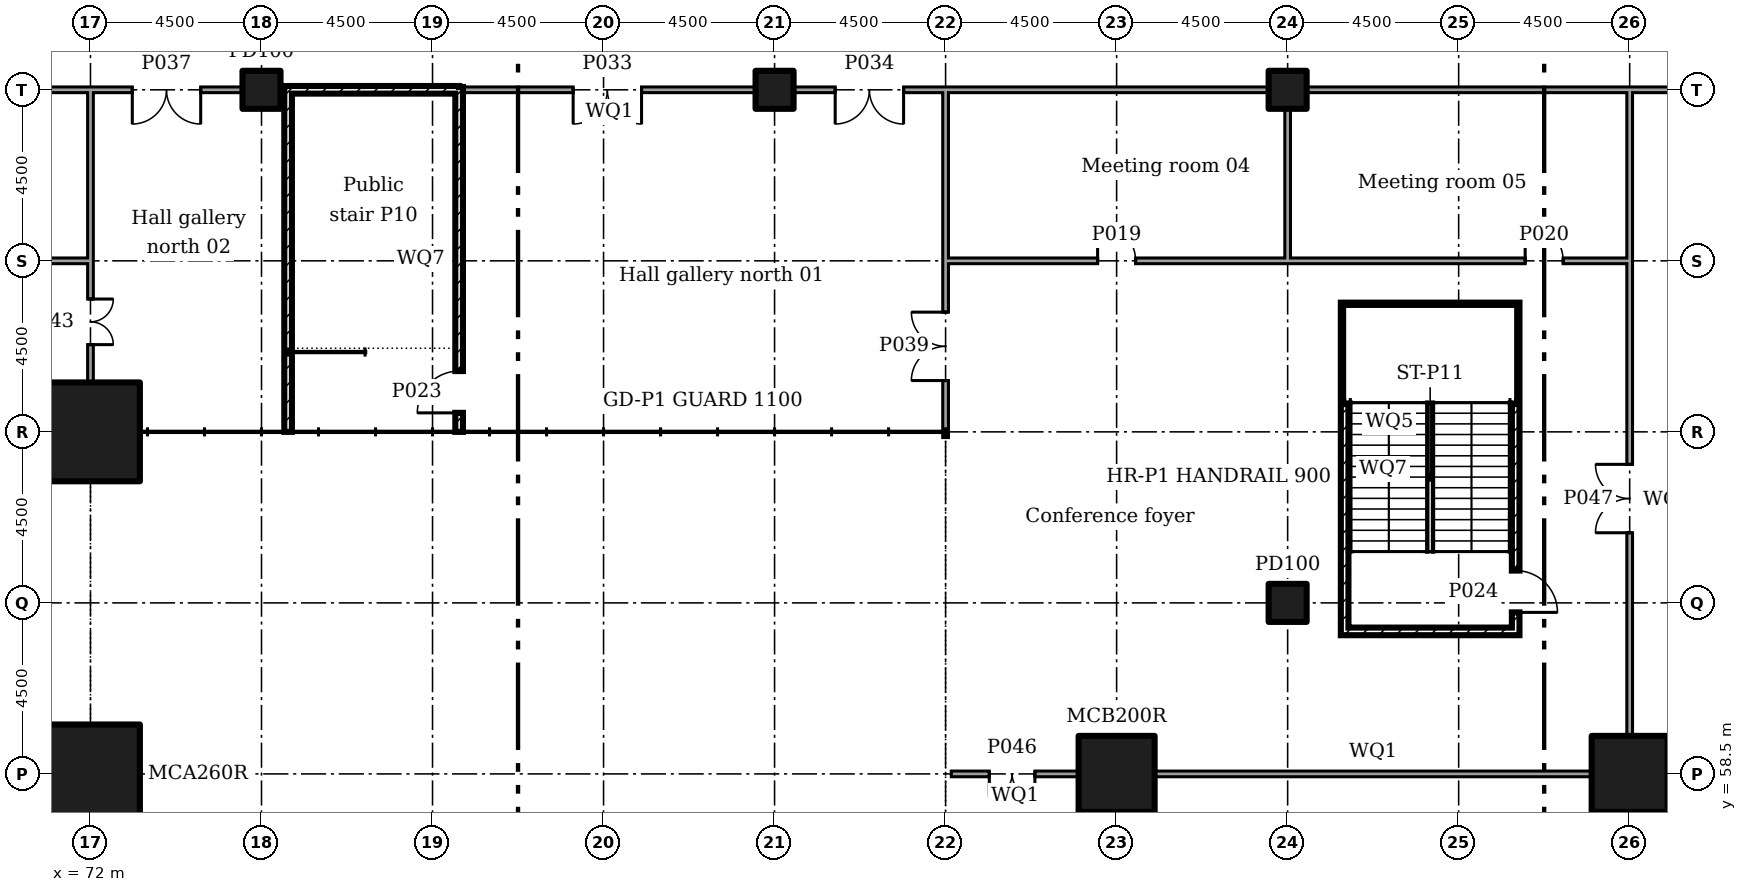
"""IFC4 building model, lengths in metres.
Left out: names, types, materials, properties, quantities, classifications, styles, units other than length and angle.
Written with IfcOpenShell. Run it as: python <this file> out.ifc"""

import sys

from ifc_helpers import new_model, si_unit, direction, frame, frame_2d, origin, origin_2d, place, context, subcontext, project, spatial, rectangle, extrude, element, fill, save


model = new_model("IFC4")
c1 = context("Model", 3, precision=1e-05, world=origin(), true_north=direction((0.0, 1.0)))
c2 = subcontext(c1, "Body", "Model", "MODEL_VIEW")
j1 = project(units=[si_unit("LENGTHUNIT", "METRE"), si_unit("PLANEANGLEUNIT", "RADIAN")], contexts=[c1])
p1 = place(None, origin())
s1 = spatial("IfcSite", under=j1, at=p1, CompositionType="ELEMENT")
p2 = place(p1, origin())
s2 = spatial("IfcBuilding", under=s1, at=p2, CompositionType="ELEMENT")
p3 = place(p2, frame((0.0, 0.0, 11.5)))
s3 = spatial("IfcBuildingStorey", under=s2, at=p3, CompositionType="ELEMENT", Elevation=11.5)
for number, where in (
    (1, (72.0, 58.5, 0.0)),
    (2, (72.0, 67.5, 0.0)),
):
    element("IfcColumn", number, at=place(p3, frame(where)), inside=s3, PredefinedType="COLUMN", context=c2, shape_type="SweptSolid", body=[
        extrude(rectangle(XDim=2.6, YDim=2.6, at=origin_2d()), origin(), (0.0, 0.0, 1.0), 5.0),
    ])
for number, where in (
    (3, (99.0, 58.5, 0.0)),
    (4, (112.5, 58.5, 0.0)),
):
    element("IfcColumn", number, at=place(p3, frame(where)), inside=s3, PredefinedType="COLUMN", context=c2, shape_type="SweptSolid", body=[
        extrude(rectangle(XDim=2.0, YDim=2.0, at=origin_2d()), origin(), (0.0, 0.0, 1.0), 5.0),
    ])
for number, where in (
    (5, (76.5, 76.5, 0.0)),
    (6, (90.0, 76.5, 0.0)),
    (7, (103.5, 63.0, 0.0)),
    (8, (103.5, 76.5, 0.0)),
):
    element("IfcColumn", number, at=place(p3, frame(where)), inside=s3, PredefinedType="COLUMN", context=c2, shape_type="SweptSolid", body=[
        extrude(rectangle(XDim=1.0, YDim=1.0, at=origin_2d()), origin(), (0.0, 0.0, 1.0), 5.0),
    ])
p4 = place(p2, frame((0.0, 0.0, 6.0)))
s4 = spatial("IfcBuildingStorey", under=s2, at=p4, CompositionType="ELEMENT", Elevation=6.0)
p5 = place(p4, frame((72.0, 59.795, 0.0), z_axis=(0.0, 0.0, 1.0), x_axis=(0.0, 1.0, 0.0)))
e9 = element("IfcWall", 9, at=p5, inside=s4, PredefinedType="SOLIDWALL", context=c2, shape_type="SweptSolid", body=[
    extrude(rectangle(XDim=6.41, YDim=0.3, at=frame_2d((3.205, 0.0))), origin(), (0.0, 0.0, 1.0), 10.05),
])
p6 = place(p4, frame((94.5, 54.995, 0.0), z_axis=(0.0, 0.0, 1.0), x_axis=(0.0, 1.0, 0.0)))
e10 = element("IfcWall", 10, at=p6, inside=s4, PredefinedType="SOLIDWALL", context=c2, shape_type="SweptSolid", body=[
    extrude(rectangle(XDim=3.58, YDim=0.3, at=frame_2d((1.79, 0.0))), origin(), (0.0, 0.0, 1.0), 10.05),
])
p7 = place(p4, frame((94.5, 58.425, 0.0), z_axis=(0.0, 0.0, 1.0), x_axis=(0.0, 1.0, 0.0)))
e11 = element("IfcWall", 11, at=p7, inside=s4, PredefinedType="SOLIDWALL", context=c2, shape_type="SweptSolid", body=[
    extrude(rectangle(XDim=8.925, YDim=0.3, at=frame_2d((4.462, 0.0))), origin(), (0.0, 0.0, 1.0), 10.05),
])
p8 = place(p3, frame((81.8, 76.5, 0.0)))
e12 = element("IfcWall", 12, at=p8, inside=s3, PredefinedType="PARTITIONING", context=c2, shape_type="SweptSolid", body=[
    extrude(rectangle(XDim=7.705, YDim=0.15, at=frame_2d((3.853, 0.0))), origin(), (0.0, 0.0, 1.0), 4.55),
])
p9 = place(p8, frame((2.9, 0.0, 0.0)))
e13 = element("IfcOpeningElement", 13, at=p9, cuts=e12, PredefinedType="OPENING", context=c2, shape_type="SweptSolid", body=[
    extrude(rectangle(XDim=1.8, YDim=2.1, at=frame_2d((0.9, 1.05))), frame((0.0, 0.085, 0.0), z_axis=(0.0, -1.0, 0.0), x_axis=(1.0, 0.0, 0.0)), (0.0, 0.0, 1.0), 0.17),
])
p10 = place(p3, frame((90.495, 76.5, 0.0)))
e14 = element("IfcWall", 14, at=p10, inside=s3, PredefinedType="PARTITIONING", context=c2, shape_type="SweptSolid", body=[
    extrude(rectangle(XDim=4.08, YDim=0.15, at=frame_2d((2.04, 0.0))), origin(), (0.0, 0.0, 1.0), 4.55),
])
p11 = place(p10, frame((1.1, 0.0, 0.0)))
e15 = element("IfcOpeningElement", 15, at=p11, cuts=e14, PredefinedType="OPENING", context=c2, shape_type="SweptSolid", body=[
    extrude(rectangle(XDim=1.8, YDim=2.1, at=frame_2d((0.9, 1.05))), frame((0.0, 0.085, 0.0), z_axis=(0.0, -1.0, 0.0), x_axis=(1.0, 0.0, 0.0)), (0.0, 0.0, 1.0), 0.17),
])
p12 = place(p3, frame((63.495, 76.5, 0.0)))
e16 = element("IfcWall", 16, at=p12, inside=s3, PredefinedType="PARTITIONING", context=c2, shape_type="SweptSolid", body=[
    extrude(rectangle(XDim=8.58, YDim=0.15, at=frame_2d((4.29, 0.0))), origin(), (0.0, 0.0, 1.0), 4.55),
])
p13 = place(p3, frame((94.5, 76.5, 0.0)))
e17 = element("IfcWall", 17, at=p13, inside=s3, PredefinedType="PARTITIONING", context=c2, shape_type="SweptSolid", body=[
    extrude(rectangle(XDim=8.505, YDim=0.15, at=frame_2d((4.252, 0.0))), origin(), (0.0, 0.0, 1.0), 4.55),
])
p14 = place(p3, frame((103.995, 76.5, 0.0)))
e18 = element("IfcWall", 18, at=p14, inside=s3, PredefinedType="PARTITIONING", context=c2, shape_type="SweptSolid", body=[
    extrude(rectangle(XDim=8.58, YDim=0.15, at=frame_2d((4.29, 0.0))), origin(), (0.0, 0.0, 1.0), 4.55),
])
p15 = place(p3, frame((112.5, 76.5, 0.0)))
e19 = element("IfcWall", 19, at=p15, inside=s3, PredefinedType="PARTITIONING", context=c2, shape_type="SweptSolid", body=[
    extrude(rectangle(XDim=4.005, YDim=0.15, at=frame_2d((2.002, 0.0))), origin(), (0.0, 0.0, 1.0), 4.55),
])
p16 = place(p15, frame((1.1, 0.0, 0.0)))
e20 = element("IfcOpeningElement", 20, at=p16, cuts=e19, PredefinedType="OPENING", context=c2, shape_type="SweptSolid", body=[
    extrude(rectangle(XDim=1.8, YDim=2.1, at=frame_2d((0.9, 1.05))), frame((0.0, 0.085, 0.0), z_axis=(0.0, -1.0, 0.0), x_axis=(1.0, 0.0, 0.0)), (0.0, 0.0, 1.0), 0.17),
])
p17 = place(p3, frame((72.0, 76.5, 0.0)))
e21 = element("IfcWall", 21, at=p17, inside=s3, PredefinedType="PARTITIONING", context=c2, shape_type="SweptSolid", body=[
    extrude(rectangle(XDim=4.005, YDim=0.15, at=frame_2d((2.002, 0.0))), origin(), (0.0, 0.0, 1.0), 4.55),
])
p18 = place(p17, frame((1.1, 0.0, 0.0)))
e22 = element("IfcOpeningElement", 22, at=p18, cuts=e21, PredefinedType="OPENING", context=c2, shape_type="SweptSolid", body=[
    extrude(rectangle(XDim=1.8, YDim=2.1, at=frame_2d((0.9, 1.05))), frame((0.0, 0.085, 0.0), z_axis=(0.0, -1.0, 0.0), x_axis=(1.0, 0.0, 0.0)), (0.0, 0.0, 1.0), 0.17),
])
p19 = place(p3, frame((77.1, 76.5, 0.0)))
e23 = element("IfcWall", 23, at=p19, inside=s3, PredefinedType="SOLIDWALL", context=c2, shape_type="SweptSolid", body=[
    extrude(rectangle(XDim=4.6, YDim=0.2, at=frame_2d((2.3, 0.0))), origin(), (0.0, 0.0, 1.0), 4.55),
])
p20 = place(p3, frame((94.5, 67.35, 0.0), z_axis=(0.0, 0.0, 1.0), x_axis=(0.0, 1.0, 0.0)))
e24 = element("IfcWall", 24, at=p20, inside=s3, PredefinedType="PARTITIONING", context=c2, shape_type="SweptSolid", body=[
    extrude(rectangle(XDim=4.725, YDim=0.15, at=frame_2d((2.362, 0.0))), origin(), (0.0, 0.0, 1.0), 4.55),
])
p21 = place(p20, frame((1.5, 0.0, 0.0)))
e25 = element("IfcOpeningElement", 25, at=p21, cuts=e24, PredefinedType="OPENING", context=c2, shape_type="SweptSolid", body=[
    extrude(rectangle(XDim=1.8, YDim=2.1, at=frame_2d((0.9, 1.05))), frame((0.0, 0.085, 0.0), z_axis=(0.0, -1.0, 0.0), x_axis=(1.0, 0.0, 0.0)), (0.0, 0.0, 1.0), 0.17),
])
p22 = place(p3, frame((94.5, 72.0, 0.0), z_axis=(0.0, 0.0, 1.0), x_axis=(0.0, 1.0, 0.0)))
e26 = element("IfcWall", 26, at=p22, inside=s3, PredefinedType="PARTITIONING", context=c2, shape_type="SweptSolid", body=[
    extrude(rectangle(XDim=4.425, YDim=0.15, at=frame_2d((2.212, 0.0))), origin(), (0.0, 0.0, 1.0), 4.55),
])
p23 = place(p3, frame((81.7, 67.5, 0.0), z_axis=(0.0, 0.0, 1.0), x_axis=(0.0, 1.0, 0.0)))
e27 = element("IfcWall", 27, at=p23, inside=s3, PredefinedType="SOLIDWALL", context=c2, shape_type="SweptSolid", body=[
    extrude(rectangle(XDim=9.075, YDim=0.2, at=frame_2d((4.538, 0.0))), origin(), (0.0, 0.0, 1.0), 4.55),
])
p24 = place(p23, frame((0.5, 0.0, 0.0)))
e28 = element("IfcOpeningElement", 28, at=p24, cuts=e27, PredefinedType="OPENING", context=c2, shape_type="SweptSolid", body=[
    extrude(rectangle(XDim=1.1, YDim=2.1, at=frame_2d((0.55, 1.05))), frame((0.0, 0.11, 0.0), z_axis=(0.0, -1.0, 0.0), x_axis=(1.0, 0.0, 0.0)), (0.0, 0.0, 1.0), 0.22),
])
p25 = place(p3, frame((68.795, 72.0, 0.0)))
e29 = element("IfcWall", 29, at=p25, inside=s3, PredefinedType="PARTITIONING", context=c2, shape_type="SweptSolid", body=[
    extrude(rectangle(XDim=3.28, YDim=0.15, at=frame_2d((1.64, 0.0))), origin(), (0.0, 0.0, 1.0), 4.55),
])
p26 = place(p3, frame((72.0, 72.0, 0.0), z_axis=(0.0, 0.0, 1.0), x_axis=(0.0, 1.0, 0.0)))
e30 = element("IfcWall", 30, at=p26, inside=s3, PredefinedType="PARTITIONING", context=c2, shape_type="SweptSolid", body=[
    extrude(rectangle(XDim=4.425, YDim=0.15, at=frame_2d((2.212, 0.0))), origin(), (0.0, 0.0, 1.0), 4.55),
])
p27 = place(p3, frame((72.0, 68.795, 0.0), z_axis=(0.0, 0.0, 1.0), x_axis=(0.0, 1.0, 0.0)))
e31 = element("IfcWall", 31, at=p27, inside=s3, PredefinedType="PARTITIONING", context=c2, shape_type="SweptSolid", body=[
    extrude(rectangle(XDim=3.13, YDim=0.15, at=frame_2d((1.565, 0.0))), origin(), (0.0, 0.0, 1.0), 4.55),
])
p28 = place(p27, frame((1.0, 0.0, 0.0)))
e32 = element("IfcOpeningElement", 32, at=p28, cuts=e31, PredefinedType="OPENING", context=c2, shape_type="SweptSolid", body=[
    extrude(rectangle(XDim=1.2, YDim=2.1, at=frame_2d((0.6, 1.05))), frame((0.0, 0.085, 0.0), z_axis=(0.0, -1.0, 0.0), x_axis=(1.0, 0.0, 0.0)), (0.0, 0.0, 1.0), 0.17),
])
p29 = place(p3, frame((99.0, 54.0, 0.0), z_axis=(0.0, 0.0, 1.0), x_axis=(0.0, 1.0, 0.0)))
e33 = element("IfcWall", 33, at=p29, inside=s3, PredefinedType="PARTITIONING", context=c2, shape_type="SweptSolid", body=[
    extrude(rectangle(XDim=3.505, YDim=0.15, at=frame_2d((1.752, 0.0))), origin(), (0.0, 0.0, 1.0), 4.55),
])
p30 = place(p3, frame((94.65, 58.5, 0.0)))
e34 = element("IfcWall", 34, at=p30, inside=s3, PredefinedType="PARTITIONING", context=c2, shape_type="SweptSolid", body=[
    extrude(rectangle(XDim=3.355, YDim=0.15, at=frame_2d((1.677, 0.0))), origin(), (0.0, 0.0, 1.0), 4.55),
])
p31 = place(p30, frame((1.0, 0.0, 0.0)))
e35 = element("IfcOpeningElement", 35, at=p31, cuts=e34, PredefinedType="OPENING", context=c2, shape_type="SweptSolid", body=[
    extrude(rectangle(XDim=1.2, YDim=2.1, at=frame_2d((0.6, 1.05))), frame((0.0, 0.085, 0.0), z_axis=(0.0, -1.0, 0.0), x_axis=(1.0, 0.0, 0.0)), (0.0, 0.0, 1.0), 0.17),
])
p32 = place(p3, frame((99.995, 58.5, 0.0)))
e36 = element("IfcWall", 36, at=p32, inside=s3, PredefinedType="PARTITIONING", context=c2, shape_type="SweptSolid", body=[
    extrude(rectangle(XDim=11.51, YDim=0.15, at=frame_2d((5.755, 0.0))), origin(), (0.0, 0.0, 1.0), 4.55),
])
p33 = place(p3, frame((113.495, 58.5, 0.0)))
e37 = element("IfcWall", 37, at=p33, inside=s3, PredefinedType="PARTITIONING", context=c2, shape_type="SweptSolid", body=[
    extrude(rectangle(XDim=7.01, YDim=0.15, at=frame_2d((3.505, 0.0))), origin(), (0.0, 0.0, 1.0), 4.55),
])
p34 = place(p3, frame((94.575, 72.0, 0.0)))
e38 = element("IfcWall", 38, at=p34, inside=s3, PredefinedType="PARTITIONING", context=c2, shape_type="SweptSolid", body=[
    extrude(rectangle(XDim=9.0, YDim=0.15, at=frame_2d((4.5, 0.0))), origin(), (0.0, 0.0, 1.0), 4.55),
])
p35 = place(p34, frame((3.925, 0.0, 0.0)))
e39 = element("IfcOpeningElement", 39, at=p35, cuts=e38, PredefinedType="OPENING", context=c2, shape_type="SweptSolid", body=[
    extrude(rectangle(XDim=1.0, YDim=2.1, at=frame_2d((0.5, 1.05))), frame((0.0, 0.085, 0.0), z_axis=(0.0, -1.0, 0.0), x_axis=(1.0, 0.0, 0.0)), (0.0, 0.0, 1.0), 0.17),
])
p36 = place(p3, frame((103.5, 72.0, 0.0)))
e40 = element("IfcWall", 40, at=p36, inside=s3, PredefinedType="PARTITIONING", context=c2, shape_type="SweptSolid", body=[
    extrude(rectangle(XDim=9.075, YDim=0.15, at=frame_2d((4.538, 0.0))), origin(), (0.0, 0.0, 1.0), 4.55),
])
p37 = place(p36, frame((6.25, 0.0, 0.0)))
e41 = element("IfcOpeningElement", 41, at=p37, cuts=e40, PredefinedType="OPENING", context=c2, shape_type="SweptSolid", body=[
    extrude(rectangle(XDim=1.0, YDim=2.1, at=frame_2d((0.5, 1.05))), frame((0.0, 0.085, 0.0), z_axis=(0.0, -1.0, 0.0), x_axis=(1.0, 0.0, 0.0)), (0.0, 0.0, 1.0), 0.17),
])
p38 = place(p3, frame((112.5, 59.495, 0.0), z_axis=(0.0, 0.0, 1.0), x_axis=(0.0, 1.0, 0.0)))
e42 = element("IfcWall", 42, at=p38, inside=s3, PredefinedType="PARTITIONING", context=c2, shape_type="SweptSolid", body=[
    extrude(rectangle(XDim=12.43, YDim=0.15, at=frame_2d((6.215, 0.0))), origin(), (0.0, 0.0, 1.0), 4.55),
])
p39 = place(p38, frame((5.35, 0.0, 0.0)))
e43 = element("IfcOpeningElement", 43, at=p39, cuts=e42, PredefinedType="OPENING", context=c2, shape_type="SweptSolid", body=[
    extrude(rectangle(XDim=1.8, YDim=2.1, at=frame_2d((0.9, 1.05))), frame((0.0, 0.085, 0.0), z_axis=(0.0, -1.0, 0.0), x_axis=(1.0, 0.0, 0.0)), (0.0, 0.0, 1.0), 0.17),
])
p40 = place(p3, frame((105.0, 62.15, 0.0), z_axis=(0.0, 0.0, 1.0), x_axis=(0.0, 1.0, 0.0)))
e44 = element("IfcWall", 44, at=p40, inside=s3, PredefinedType="SOLIDWALL", context=c2, shape_type="SweptSolid", body=[
    extrude(rectangle(XDim=8.75, YDim=0.2, at=frame_2d((4.375, 0.0))), origin(), (0.0, 0.0, 1.0), 4.55),
])
p41 = place(p3, frame((109.5, 62.15, 0.0), z_axis=(0.0, 0.0, 1.0), x_axis=(0.0, 1.0, 0.0)))
e45 = element("IfcWall", 45, at=p41, inside=s3, PredefinedType="SOLIDWALL", context=c2, shape_type="SweptSolid", body=[
    extrude(rectangle(XDim=8.75, YDim=0.2, at=frame_2d((4.375, 0.0))), origin(), (0.0, 0.0, 1.0), 4.55),
])
p42 = place(p41, frame((0.6, 0.0, 0.0)))
e46 = element("IfcOpeningElement", 46, at=p42, cuts=e45, PredefinedType="OPENING", context=c2, shape_type="SweptSolid", body=[
    extrude(rectangle(XDim=1.1, YDim=2.1, at=frame_2d((0.55, 1.05))), frame((0.0, 0.11, 0.0), z_axis=(0.0, -1.0, 0.0), x_axis=(1.0, 0.0, 0.0)), (0.0, 0.0, 1.0), 0.22),
])
for number, where in (
    (47, (105.1, 62.25, 0.0)),
    (48, (105.1, 70.8, 0.0)),
):
    element("IfcWall", number, at=place(p3, frame(where)), inside=s3, PredefinedType="SOLIDWALL", context=c2, shape_type="SweptSolid", body=[
        extrude(rectangle(XDim=4.3, YDim=0.2, at=frame_2d((2.15, 0.0))), origin(), (0.0, 0.0, 1.0), 4.55),
    ])
p43 = place(p3, frame((103.5, 72.075, 0.0), z_axis=(0.0, 0.0, 1.0), x_axis=(0.0, 1.0, 0.0)))
e49 = element("IfcWall", 49, at=p43, inside=s3, PredefinedType="PARTITIONING", context=c2, shape_type="SweptSolid", body=[
    extrude(rectangle(XDim=3.93, YDim=0.15, at=frame_2d((1.965, 0.0))), origin(), (0.0, 0.0, 1.0), 4.55),
])
p44 = place(p3, frame((112.5, 72.0, 0.0), z_axis=(0.0, 0.0, 1.0), x_axis=(0.0, 1.0, 0.0)))
e50 = element("IfcWall", 50, at=p44, inside=s3, PredefinedType="PARTITIONING", context=c2, shape_type="SweptSolid", body=[
    extrude(rectangle(XDim=4.425, YDim=0.15, at=frame_2d((2.212, 0.0))), origin(), (0.0, 0.0, 1.0), 4.55),
])
p45 = place(p3, frame((77.2, 67.5, 0.0), z_axis=(0.0, 0.0, 1.0), x_axis=(0.0, 1.0, 0.0)))
e51 = element("IfcWall", 51, at=p45, inside=s3, PredefinedType="SOLIDWALL", context=c2, shape_type="SweptSolid", body=[
    extrude(rectangle(XDim=8.9, YDim=0.2, at=frame_2d((4.45, 0.0))), origin(), (0.0, 0.0, 1.0), 4.55),
])
for number, where in (
    (52, (105.1, 68.37, 0.0)),
    (53, (105.1, 70.1, 0.0)),
):
    element("IfcWall", number, at=place(p3, frame(where)), inside=s3, PredefinedType="SOLIDWALL", context=c2, shape_type="SweptSolid", body=[
        extrude(rectangle(XDim=4.3, YDim=0.2, at=frame_2d((2.15, 0.0))), origin(), (0.0, 0.0, 1.0), 2.3),
    ])
p46 = place(p35, origin())
e54 = element("IfcDoor", 54, at=p46, inside=s3, OperationType="SINGLE_SWING_RIGHT", PredefinedType="DOOR", context=c2, shape_type="SweptSolid", body=[
    extrude(rectangle(XDim=1.0, YDim=2.1, at=frame_2d((0.5, 1.05))), frame((0.0, 0.025, 0.0), z_axis=(0.0, -1.0, 0.0), x_axis=(1.0, 0.0, 0.0)), (0.0, 0.0, 1.0), 0.05),
])
fill(e39, e54)
p47 = place(p37, origin())
e55 = element("IfcDoor", 55, at=p47, inside=s3, OperationType="SINGLE_SWING_RIGHT", PredefinedType="DOOR", context=c2, shape_type="SweptSolid", body=[
    extrude(rectangle(XDim=1.0, YDim=2.1, at=frame_2d((0.5, 1.05))), frame((0.0, 0.025, 0.0), z_axis=(0.0, -1.0, 0.0), x_axis=(1.0, 0.0, 0.0)), (0.0, 0.0, 1.0), 0.05),
])
fill(e41, e55)
p48 = place(p24, origin())
e56 = element("IfcDoor", 56, at=p48, inside=s3, OperationType="SINGLE_SWING_RIGHT", PredefinedType="DOOR", context=c2, shape_type="SweptSolid", body=[
    extrude(rectangle(XDim=1.1, YDim=2.1, at=frame_2d((0.55, 1.05))), frame((0.0, 0.025, 0.0), z_axis=(0.0, -1.0, 0.0), x_axis=(1.0, 0.0, 0.0)), (0.0, 0.0, 1.0), 0.05),
])
fill(e28, e56)
p49 = place(p42, frame((1.1, 0.0, 0.0), x_axis=(-1.0, 0.0, 0.0)))
e57 = element("IfcDoor", 57, at=p49, inside=s3, OperationType="SINGLE_SWING_LEFT", PredefinedType="DOOR", context=c2, shape_type="SweptSolid", body=[
    extrude(rectangle(XDim=1.1, YDim=2.1, at=frame_2d((0.55, 1.05))), frame((0.0, 0.025, 0.0), z_axis=(0.0, -1.0, 0.0), x_axis=(1.0, 0.0, 0.0)), (0.0, 0.0, 1.0), 0.05),
])
fill(e46, e57)
p50 = place(p9, frame((1.8, 0.0, 0.0), x_axis=(-1.0, 0.0, 0.0)))
e58 = element("IfcDoor", 58, at=p50, inside=s3, OperationType="DOUBLE_DOOR_SINGLE_SWING", PredefinedType="DOOR", context=c2, shape_type="SweptSolid", body=[
    extrude(rectangle(XDim=1.8, YDim=2.1, at=frame_2d((0.9, 1.05))), frame((0.0, 0.025, 0.0), z_axis=(0.0, -1.0, 0.0), x_axis=(1.0, 0.0, 0.0)), (0.0, 0.0, 1.0), 0.05),
])
fill(e13, e58)
p51 = place(p11, frame((1.8, 0.0, 0.0), x_axis=(-1.0, 0.0, 0.0)))
e59 = element("IfcDoor", 59, at=p51, inside=s3, OperationType="DOUBLE_DOOR_SINGLE_SWING", PredefinedType="DOOR", context=c2, shape_type="SweptSolid", body=[
    extrude(rectangle(XDim=1.8, YDim=2.1, at=frame_2d((0.9, 1.05))), frame((0.0, 0.025, 0.0), z_axis=(0.0, -1.0, 0.0), x_axis=(1.0, 0.0, 0.0)), (0.0, 0.0, 1.0), 0.05),
])
fill(e15, e59)
p52 = place(p18, frame((1.8, 0.0, 0.0), x_axis=(-1.0, 0.0, 0.0)))
e60 = element("IfcDoor", 60, at=p52, inside=s3, OperationType="DOUBLE_DOOR_SINGLE_SWING", PredefinedType="DOOR", context=c2, shape_type="SweptSolid", body=[
    extrude(rectangle(XDim=1.8, YDim=2.1, at=frame_2d((0.9, 1.05))), frame((0.0, 0.025, 0.0), z_axis=(0.0, -1.0, 0.0), x_axis=(1.0, 0.0, 0.0)), (0.0, 0.0, 1.0), 0.05),
])
fill(e22, e60)
p53 = place(p21, origin())
e61 = element("IfcDoor", 61, at=p53, inside=s3, OperationType="DOUBLE_DOOR_SINGLE_SWING", PredefinedType="DOOR", context=c2, shape_type="SweptSolid", body=[
    extrude(rectangle(XDim=1.8, YDim=2.1, at=frame_2d((0.9, 1.05))), frame((0.0, 0.025, 0.0), z_axis=(0.0, -1.0, 0.0), x_axis=(1.0, 0.0, 0.0)), (0.0, 0.0, 1.0), 0.05),
])
fill(e25, e61)
p54 = place(p28, frame((1.2, 0.0, 0.0), x_axis=(-1.0, 0.0, 0.0)))
e62 = element("IfcDoor", 62, at=p54, inside=s3, OperationType="DOUBLE_DOOR_SINGLE_SWING", PredefinedType="DOOR", context=c2, shape_type="SweptSolid", body=[
    extrude(rectangle(XDim=1.2, YDim=2.1, at=frame_2d((0.6, 1.05))), frame((0.0, 0.025, 0.0), z_axis=(0.0, -1.0, 0.0), x_axis=(1.0, 0.0, 0.0)), (0.0, 0.0, 1.0), 0.05),
])
fill(e32, e62)
p55 = place(p31, frame((1.2, 0.0, 0.0), x_axis=(-1.0, 0.0, 0.0)))
e63 = element("IfcDoor", 63, at=p55, inside=s3, OperationType="DOUBLE_DOOR_SINGLE_SWING", PredefinedType="DOOR", context=c2, shape_type="SweptSolid", body=[
    extrude(rectangle(XDim=1.2, YDim=2.1, at=frame_2d((0.6, 1.05))), frame((0.0, 0.025, 0.0), z_axis=(0.0, -1.0, 0.0), x_axis=(1.0, 0.0, 0.0)), (0.0, 0.0, 1.0), 0.05),
])
fill(e35, e63)
p56 = place(p39, origin())
e64 = element("IfcDoor", 64, at=p56, inside=s3, OperationType="DOUBLE_DOOR_SINGLE_SWING", PredefinedType="DOOR", context=c2, shape_type="SweptSolid", body=[
    extrude(rectangle(XDim=1.8, YDim=2.1, at=frame_2d((0.9, 1.05))), frame((0.0, 0.025, 0.0), z_axis=(0.0, -1.0, 0.0), x_axis=(1.0, 0.0, 0.0)), (0.0, 0.0, 1.0), 0.05),
])
fill(e43, e64)
save(model, sys.argv[1])
